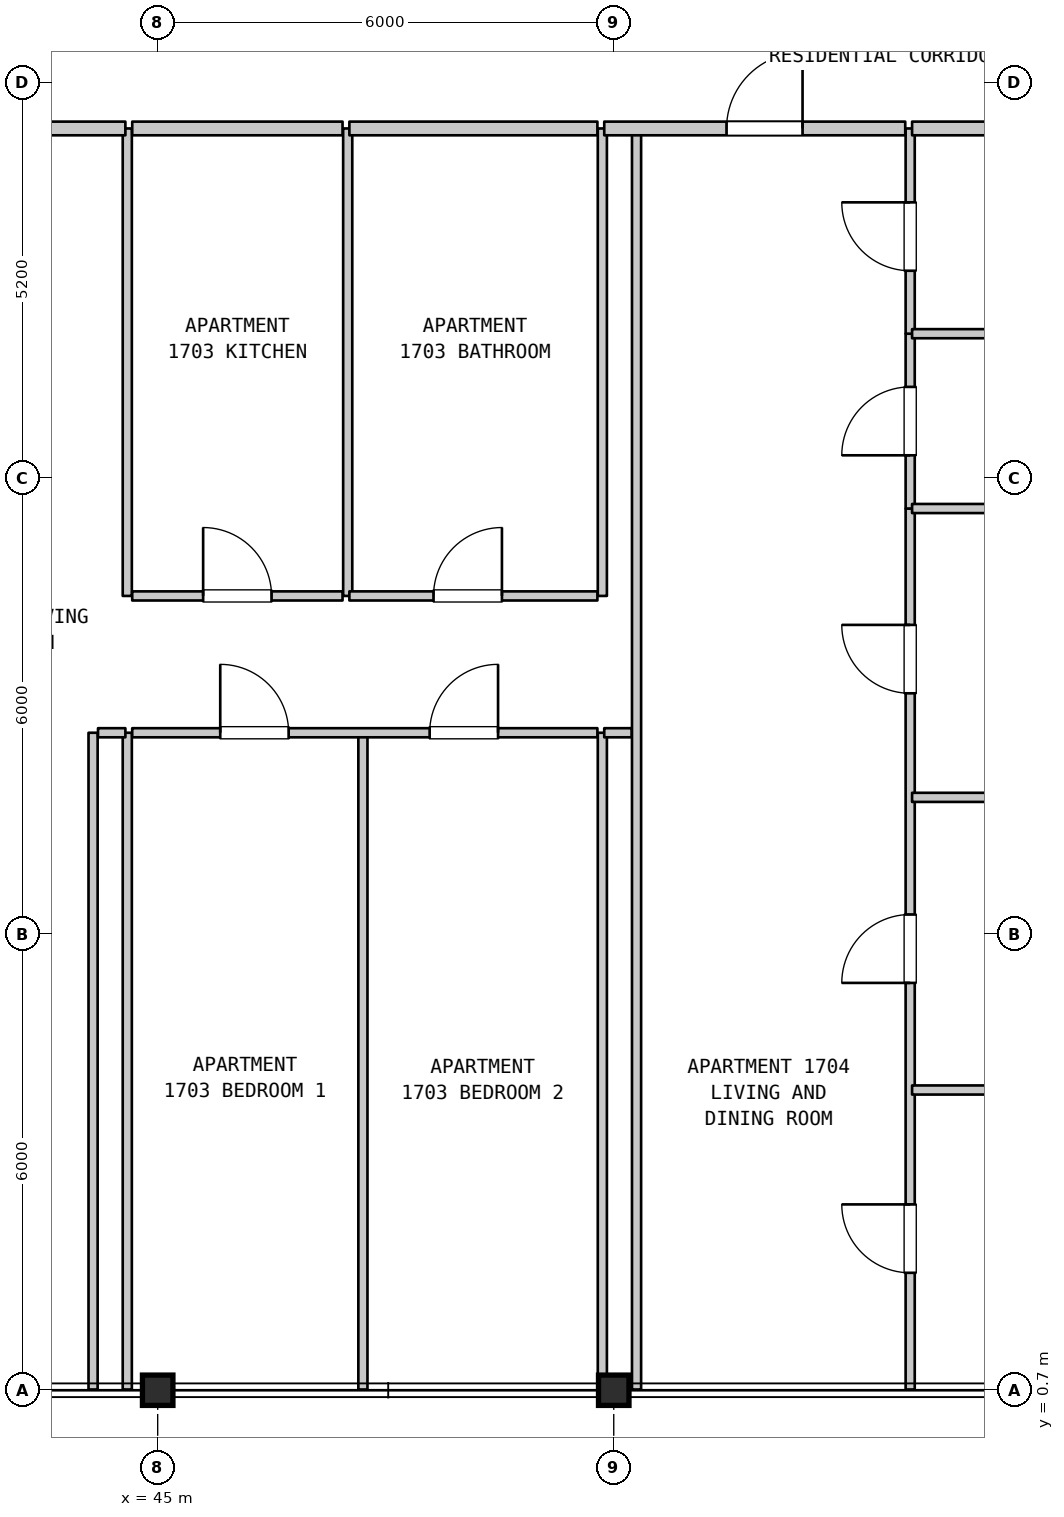
"""IFC4 building model, lengths in metres.
Left out: names, types, materials, properties, quantities, classifications, styles, units other than length and angle.
Written with IfcOpenShell. Run it as: python <this file> out.ifc"""

import sys

from ifc_helpers import new_model, si_unit, direction, frame, frame_2d, origin, origin_2d, place, context, subcontext, project, spatial, rectangle, i_section, extrude, element, fill, save


model = new_model("IFC4")
c1 = context("Model", 3, precision=1e-05, world=origin(), true_north=direction((0.0, 1.0)))
c2 = subcontext(c1, "Body", "Model", "MODEL_VIEW")
j1 = project(units=[si_unit("LENGTHUNIT", "METRE"), si_unit("PLANEANGLEUNIT", "RADIAN")], contexts=[c1])
p1 = place(None, origin())
s1 = spatial("IfcSite", under=j1, at=p1, CompositionType="ELEMENT")
p2 = place(p1, origin())
s2 = spatial("IfcBuilding", under=s1, at=p2, CompositionType="ELEMENT")
p3 = place(p2, frame((0.0, 0.0, 73.8)))
s3 = spatial("IfcBuildingStorey", under=s2, at=p3, CompositionType="ELEMENT", Elevation=73.8)
for number, where, z_axis, x_axis in (
    (1, (45.0, 0.7, 0.0), (0.0, 0.0, 1.0), (1.0, 0.0, 0.0)),
    (2, (51.0, 0.7, 0.0), (0.0, 0.0, 1.0), (1.0, 0.0, 0.0)),
):
    element("IfcColumn", number, at=place(p3, frame(where, z_axis=z_axis, x_axis=x_axis)), inside=s3, PredefinedType="COLUMN", context=c2, shape_type="SweptSolid", body=[
        extrude(i_section(OverallWidth=0.401, OverallDepth=0.399, WebThickness=0.025, FlangeThickness=0.04, FilletRadius=0.015, at=origin_2d()), origin(), (0.0, 0.0, 1.0), 3.7),
    ])
for number, where, z_axis, x_axis in (
    (3, (44.15, 0.71, 0.0), (0.0, 0.0, 1.0), (0.0, 1.0, 0.0)),
    (4, (44.6, 0.71, 0.0), (0.0, 0.0, 1.0), (0.0, 1.0, 0.0)),
):
    element("IfcWall", number, at=place(p3, frame(where, z_axis=z_axis, x_axis=x_axis)), inside=s3, PredefinedType="PARTITIONING", context=c2, shape_type="SweptSolid", body=[
        extrude(rectangle(XDim=8.64, YDim=0.12, at=frame_2d((4.32, 0.0))), origin(), (0.0, 0.0, 1.0), 3.385),
    ])
for number, where, z_axis, x_axis in (
    (5, (44.6, 11.15, 0.0), (0.0, 0.0, 1.0), (0.0, 1.0, 0.0)),
    (6, (47.5, 11.15, 0.0), (0.0, 0.0, 1.0), (0.0, 1.0, 0.0)),
):
    element("IfcWall", number, at=place(p3, frame(where, z_axis=z_axis, x_axis=x_axis)), inside=s3, PredefinedType="PARTITIONING", context=c2, shape_type="SweptSolid", body=[
        extrude(rectangle(XDim=6.15, YDim=0.12, at=frame_2d((3.075, 0.0))), origin(), (0.0, 0.0, 1.0), 3.385),
    ])
for number, where, z_axis, x_axis in (
    (7, (47.7, 0.71, 0.0), (0.0, 0.0, 1.0), (0.0, 1.0, 0.0)),
    (8, (50.85, 0.71, 0.0), (0.0, 0.0, 1.0), (0.0, 1.0, 0.0)),
):
    element("IfcWall", number, at=place(p3, frame(where, z_axis=z_axis, x_axis=x_axis)), inside=s3, PredefinedType="PARTITIONING", context=c2, shape_type="SweptSolid", body=[
        extrude(rectangle(XDim=8.64, YDim=0.12, at=frame_2d((4.32, 0.0))), origin(), (0.0, 0.0, 1.0), 3.385),
    ])
p4 = place(p3, frame((50.85, 11.15, 0.0), z_axis=(0.0, 0.0, 1.0), x_axis=(0.0, 1.0, 0.0)))
e9 = element("IfcWall", 9, at=p4, inside=s3, PredefinedType="PARTITIONING", context=c2, shape_type="SweptSolid", body=[
    extrude(rectangle(XDim=6.15, YDim=0.12, at=frame_2d((3.075, 0.0))), origin(), (0.0, 0.0, 1.0), 3.385),
])
p5 = place(p3, frame((51.3, 0.71, 0.0), z_axis=(0.0, 0.0, 1.0), x_axis=(0.0, 1.0, 0.0)))
e10 = element("IfcWall", 10, at=p5, inside=s3, PredefinedType="PARTITIONING", context=c2, shape_type="SweptSolid", body=[
    extrude(rectangle(XDim=16.59, YDim=0.12, at=frame_2d((8.295, 0.0))), origin(), (0.0, 0.0, 1.0), 3.385),
])
p6 = place(p3, frame((54.9, 0.71, 0.0), z_axis=(0.0, 0.0, 1.0), x_axis=(0.0, 1.0, 0.0)))
e11 = element("IfcWall", 11, at=p6, inside=s3, PredefinedType="PARTITIONING", context=c2, shape_type="SweptSolid", body=[
    extrude(rectangle(XDim=11.59, YDim=0.12, at=frame_2d((5.795, 0.0))), origin(), (0.0, 0.0, 1.0), 3.385),
])
p7 = place(p6, frame((1.535, 0.0, 0.0)))
e12 = element("IfcOpeningElement", 12, at=p7, cuts=e11, PredefinedType="OPENING", context=c2, shape_type="SweptSolid", body=[
    extrude(rectangle(XDim=0.9, YDim=2.15, at=frame_2d((0.45, 1.075))), frame((0.0, 0.07, 0.0), z_axis=(0.0, -1.0, 0.0), x_axis=(1.0, 0.0, 0.0)), (0.0, 0.0, 1.0), 0.14),
])
p8 = place(p6, frame((5.349, 0.0, 0.0)))
e13 = element("IfcOpeningElement", 13, at=p8, cuts=e11, PredefinedType="OPENING", context=c2, shape_type="SweptSolid", body=[
    extrude(rectangle(XDim=0.9, YDim=2.15, at=frame_2d((0.45, 1.075))), frame((0.0, 0.07, 0.0), z_axis=(0.0, -1.0, 0.0), x_axis=(1.0, 0.0, 0.0)), (0.0, 0.0, 1.0), 0.14),
])
p9 = place(p6, frame((9.159, 0.0, 0.0)))
e14 = element("IfcOpeningElement", 14, at=p9, cuts=e11, PredefinedType="OPENING", context=c2, shape_type="SweptSolid", body=[
    extrude(rectangle(XDim=0.9, YDim=2.15, at=frame_2d((0.45, 1.075))), frame((0.0, 0.07, 0.0), z_axis=(0.0, -1.0, 0.0), x_axis=(1.0, 0.0, 0.0)), (0.0, 0.0, 1.0), 0.14),
])
p10 = place(p3, frame((54.9, 12.3, 0.0), z_axis=(0.0, 0.0, 1.0), x_axis=(0.0, 1.0, 0.0)))
e15 = element("IfcWall", 15, at=p10, inside=s3, PredefinedType="PARTITIONING", context=c2, shape_type="SweptSolid", body=[
    extrude(rectangle(XDim=2.3, YDim=0.12, at=frame_2d((1.15, 0.0))), origin(), (0.0, 0.0, 1.0), 3.385),
])
p11 = place(p10, frame((0.7, 0.0, 0.0)))
e16 = element("IfcOpeningElement", 16, at=p11, cuts=e15, PredefinedType="OPENING", context=c2, shape_type="SweptSolid", body=[
    extrude(rectangle(XDim=0.9, YDim=2.15, at=frame_2d((0.45, 1.075))), frame((0.0, 0.07, 0.0), z_axis=(0.0, -1.0, 0.0), x_axis=(1.0, 0.0, 0.0)), (0.0, 0.0, 1.0), 0.14),
])
p12 = place(p3, frame((54.9, 14.6, 0.0), z_axis=(0.0, 0.0, 1.0), x_axis=(0.0, 1.0, 0.0)))
e17 = element("IfcWall", 17, at=p12, inside=s3, PredefinedType="PARTITIONING", context=c2, shape_type="SweptSolid", body=[
    extrude(rectangle(XDim=2.7, YDim=0.12, at=frame_2d((1.35, 0.0))), origin(), (0.0, 0.0, 1.0), 3.385),
])
p13 = place(p12, frame((0.828, 0.0, 0.0)))
e18 = element("IfcOpeningElement", 18, at=p13, cuts=e17, PredefinedType="OPENING", context=c2, shape_type="SweptSolid", body=[
    extrude(rectangle(XDim=0.9, YDim=2.1, at=frame_2d((0.45, 1.05))), frame((0.0, 0.07, 0.0), z_axis=(0.0, -1.0, 0.0), x_axis=(1.0, 0.0, 0.0)), (0.0, 0.0, 1.0), 0.14),
])
for number, where, z_axis, x_axis in (
    (19, (54.925, 4.65, 0.0), (0.0, 0.0, 1.0), (1.0, 0.0, 0.0)),
    (20, (54.925, 8.5, 0.0), (0.0, 0.0, 1.0), (1.0, 0.0, 0.0)),
):
    element("IfcWall", number, at=place(p3, frame(where, z_axis=z_axis, x_axis=x_axis)), inside=s3, PredefinedType="PARTITIONING", context=c2, shape_type="SweptSolid", body=[
        extrude(rectangle(XDim=5.64, YDim=0.12, at=frame_2d((2.82, 0.0))), origin(), (0.0, 0.0, 1.0), 3.385),
    ])
p14 = place(p3, frame((44.215, 9.35, 0.0), z_axis=(0.0, 0.0, 1.0), x_axis=(1.0, 0.0, 0.0)))
e21 = element("IfcWall", 21, at=p14, inside=s3, PredefinedType="PARTITIONING", context=c2, shape_type="SweptSolid", body=[
    extrude(rectangle(XDim=0.36, YDim=0.12, at=frame_2d((0.18, 0.0))), origin(), (0.0, 0.0, 1.0), 3.385),
])
p15 = place(p3, frame((44.665, 9.35, 0.0), z_axis=(0.0, 0.0, 1.0), x_axis=(1.0, 0.0, 0.0)))
e22 = element("IfcWall", 22, at=p15, inside=s3, PredefinedType="PARTITIONING", context=c2, shape_type="SweptSolid", body=[
    extrude(rectangle(XDim=6.12, YDim=0.12, at=frame_2d((3.06, 0.0))), origin(), (0.0, 0.0, 1.0), 3.385),
])
p16 = place(p15, frame((1.158, 0.0, 0.0)))
e23 = element("IfcOpeningElement", 23, at=p16, cuts=e22, PredefinedType="OPENING", context=c2, shape_type="SweptSolid", body=[
    extrude(rectangle(XDim=0.9, YDim=2.15, at=frame_2d((0.45, 1.075))), frame((0.0, 0.07, 0.0), z_axis=(0.0, -1.0, 0.0), x_axis=(1.0, 0.0, 0.0)), (0.0, 0.0, 1.0), 0.14),
])
p17 = place(p15, frame((3.913, 0.0, 0.0)))
e24 = element("IfcOpeningElement", 24, at=p17, cuts=e22, PredefinedType="OPENING", context=c2, shape_type="SweptSolid", body=[
    extrude(rectangle(XDim=0.9, YDim=2.15, at=frame_2d((0.45, 1.075))), frame((0.0, 0.07, 0.0), z_axis=(0.0, -1.0, 0.0), x_axis=(1.0, 0.0, 0.0)), (0.0, 0.0, 1.0), 0.14),
])
p18 = place(p3, frame((50.875, 9.35, 0.0), z_axis=(0.0, 0.0, 1.0), x_axis=(1.0, 0.0, 0.0)))
e25 = element("IfcWall", 25, at=p18, inside=s3, PredefinedType="PARTITIONING", context=c2, shape_type="SweptSolid", body=[
    extrude(rectangle(XDim=0.36, YDim=0.12, at=frame_2d((0.18, 0.0))), origin(), (0.0, 0.0, 1.0), 3.385),
])
p19 = place(p3, frame((44.665, 11.15, 0.0), z_axis=(0.0, 0.0, 1.0), x_axis=(1.0, 0.0, 0.0)))
e26 = element("IfcWall", 26, at=p19, inside=s3, PredefinedType="PARTITIONING", context=c2, shape_type="SweptSolid", body=[
    extrude(rectangle(XDim=2.767, YDim=0.12, at=frame_2d((1.383, 0.0))), origin(), (0.0, 0.0, 1.0), 3.385),
])
p20 = place(p19, frame((0.933, 0.0, 0.0)))
e27 = element("IfcOpeningElement", 27, at=p20, cuts=e26, PredefinedType="OPENING", context=c2, shape_type="SweptSolid", body=[
    extrude(rectangle(XDim=0.9, YDim=2.15, at=frame_2d((0.45, 1.075))), frame((0.0, 0.07, 0.0), z_axis=(0.0, -1.0, 0.0), x_axis=(1.0, 0.0, 0.0)), (0.0, 0.0, 1.0), 0.14),
])
p21 = place(p3, frame((47.522, 11.15, 0.0), z_axis=(0.0, 0.0, 1.0), x_axis=(1.0, 0.0, 0.0)))
e28 = element("IfcWall", 28, at=p21, inside=s3, PredefinedType="PARTITIONING", context=c2, shape_type="SweptSolid", body=[
    extrude(rectangle(XDim=3.263, YDim=0.12, at=frame_2d((1.631, 0.0))), origin(), (0.0, 0.0, 1.0), 3.385),
])
p22 = place(p21, frame((1.107, 0.0, 0.0)))
e29 = element("IfcOpeningElement", 29, at=p22, cuts=e28, PredefinedType="OPENING", context=c2, shape_type="SweptSolid", body=[
    extrude(rectangle(XDim=0.9, YDim=2.1, at=frame_2d((0.45, 1.05))), frame((0.0, 0.07, 0.0), z_axis=(0.0, -1.0, 0.0), x_axis=(1.0, 0.0, 0.0)), (0.0, 0.0, 1.0), 0.14),
])
for number, where, z_axis, x_axis in (
    (30, (54.925, 12.3, 0.0), (0.0, 0.0, 1.0), (1.0, 0.0, 0.0)),
    (31, (54.925, 14.6, 0.0), (0.0, 0.0, 1.0), (1.0, 0.0, 0.0)),
):
    element("IfcWall", number, at=place(p3, frame(where, z_axis=z_axis, x_axis=x_axis)), inside=s3, PredefinedType="PARTITIONING", context=c2, shape_type="SweptSolid", body=[
        extrude(rectangle(XDim=5.64, YDim=0.12, at=frame_2d((2.82, 0.0))), origin(), (0.0, 0.0, 1.0), 3.385),
    ])
p23 = place(p3, frame((39.935, 17.3, 0.0), z_axis=(0.0, 0.0, 1.0), x_axis=(1.0, 0.0, 0.0)))
e32 = element("IfcWall", 32, at=p23, inside=s3, PredefinedType="STANDARD", context=c2, shape_type="SweptSolid", body=[
    extrude(rectangle(XDim=4.64, YDim=0.18, at=frame_2d((2.32, 0.0))), origin(), (0.0, 0.0, 1.0), 3.385),
])
p24 = place(p23, frame((2.02, 0.0, 0.0)))
e33 = element("IfcOpeningElement", 33, at=p24, cuts=e32, PredefinedType="OPENING", context=c2, shape_type="SweptSolid", body=[
    extrude(rectangle(XDim=1.0, YDim=2.15, at=frame_2d((0.5, 1.075))), frame((0.0, 0.1, 0.0), z_axis=(0.0, -1.0, 0.0), x_axis=(1.0, 0.0, 0.0)), (0.0, 0.0, 1.0), 0.2),
])
p25 = place(p3, frame((44.665, 17.3, 0.0), z_axis=(0.0, 0.0, 1.0), x_axis=(1.0, 0.0, 0.0)))
e34 = element("IfcWall", 34, at=p25, inside=s3, PredefinedType="STANDARD", context=c2, shape_type="SweptSolid", body=[
    extrude(rectangle(XDim=2.767, YDim=0.18, at=frame_2d((1.383, 0.0))), origin(), (0.0, 0.0, 1.0), 3.385),
])
p26 = place(p3, frame((47.522, 17.3, 0.0), z_axis=(0.0, 0.0, 1.0), x_axis=(1.0, 0.0, 0.0)))
e35 = element("IfcWall", 35, at=p26, inside=s3, PredefinedType="STANDARD", context=c2, shape_type="SweptSolid", body=[
    extrude(rectangle(XDim=3.263, YDim=0.18, at=frame_2d((1.631, 0.0))), origin(), (0.0, 0.0, 1.0), 3.385),
])
p27 = place(p3, frame((50.875, 17.3, 0.0), z_axis=(0.0, 0.0, 1.0), x_axis=(1.0, 0.0, 0.0)))
e36 = element("IfcWall", 36, at=p27, inside=s3, PredefinedType="STANDARD", context=c2, shape_type="SweptSolid", body=[
    extrude(rectangle(XDim=3.96, YDim=0.18, at=frame_2d((1.98, 0.0))), origin(), (0.0, 0.0, 1.0), 3.385),
])
p28 = place(p27, frame((1.609, 0.0, 0.0)))
e37 = element("IfcOpeningElement", 37, at=p28, cuts=e36, PredefinedType="OPENING", context=c2, shape_type="SweptSolid", body=[
    extrude(rectangle(XDim=1.0, YDim=2.15, at=frame_2d((0.5, 1.075))), frame((0.0, 0.1, 0.0), z_axis=(0.0, -1.0, 0.0), x_axis=(1.0, 0.0, 0.0)), (0.0, 0.0, 1.0), 0.2),
])
p29 = place(p3, frame((54.925, 17.3, 0.0), z_axis=(0.0, 0.0, 1.0), x_axis=(1.0, 0.0, 0.0)))
e38 = element("IfcWall", 38, at=p29, inside=s3, PredefinedType="STANDARD", context=c2, shape_type="SweptSolid", body=[
    extrude(rectangle(XDim=5.64, YDim=0.18, at=frame_2d((2.82, 0.0))), origin(), (0.0, 0.0, 1.0), 3.385),
])
p30 = place(p7, origin())
e39 = element("IfcDoor", 39, at=p30, inside=s3, OperationType="SINGLE_SWING_RIGHT", PredefinedType="DOOR", context=c2, shape_type="SweptSolid", body=[
    extrude(rectangle(XDim=0.9, YDim=2.15, at=frame_2d((0.45, 1.075))), frame((0.0, 0.025, 0.0), z_axis=(0.0, -1.0, 0.0), x_axis=(1.0, 0.0, 0.0)), (0.0, 0.0, 1.0), 0.05),
])
fill(e12, e39)
p31 = place(p8, origin())
e40 = element("IfcDoor", 40, at=p31, inside=s3, OperationType="SINGLE_SWING_LEFT", PredefinedType="DOOR", context=c2, shape_type="SweptSolid", body=[
    extrude(rectangle(XDim=0.9, YDim=2.15, at=frame_2d((0.45, 1.075))), frame((0.0, 0.025, 0.0), z_axis=(0.0, -1.0, 0.0), x_axis=(1.0, 0.0, 0.0)), (0.0, 0.0, 1.0), 0.05),
])
fill(e13, e40)
p32 = place(p9, origin())
e41 = element("IfcDoor", 41, at=p32, inside=s3, OperationType="SINGLE_SWING_RIGHT", PredefinedType="DOOR", context=c2, shape_type="SweptSolid", body=[
    extrude(rectangle(XDim=0.9, YDim=2.15, at=frame_2d((0.45, 1.075))), frame((0.0, 0.025, 0.0), z_axis=(0.0, -1.0, 0.0), x_axis=(1.0, 0.0, 0.0)), (0.0, 0.0, 1.0), 0.05),
])
fill(e14, e41)
p33 = place(p11, origin())
e42 = element("IfcDoor", 42, at=p33, inside=s3, OperationType="SINGLE_SWING_LEFT", PredefinedType="DOOR", context=c2, shape_type="SweptSolid", body=[
    extrude(rectangle(XDim=0.9, YDim=2.15, at=frame_2d((0.45, 1.075))), frame((0.0, 0.025, 0.0), z_axis=(0.0, -1.0, 0.0), x_axis=(1.0, 0.0, 0.0)), (0.0, 0.0, 1.0), 0.05),
])
fill(e16, e42)
p34 = place(p13, origin())
e43 = element("IfcDoor", 43, at=p34, inside=s3, OperationType="SINGLE_SWING_RIGHT", PredefinedType="DOOR", context=c2, shape_type="SweptSolid", body=[
    extrude(rectangle(XDim=0.9, YDim=2.1, at=frame_2d((0.45, 1.05))), frame((0.0, 0.025, 0.0), z_axis=(0.0, -1.0, 0.0), x_axis=(1.0, 0.0, 0.0)), (0.0, 0.0, 1.0), 0.05),
])
fill(e18, e43)
p35 = place(p16, origin())
e44 = element("IfcDoor", 44, at=p35, inside=s3, OperationType="SINGLE_SWING_LEFT", PredefinedType="DOOR", context=c2, shape_type="SweptSolid", body=[
    extrude(rectangle(XDim=0.9, YDim=2.15, at=frame_2d((0.45, 1.075))), frame((0.0, 0.025, 0.0), z_axis=(0.0, -1.0, 0.0), x_axis=(1.0, 0.0, 0.0)), (0.0, 0.0, 1.0), 0.05),
])
fill(e23, e44)
p36 = place(p17, origin())
e45 = element("IfcDoor", 45, at=p36, inside=s3, OperationType="SINGLE_SWING_RIGHT", PredefinedType="DOOR", context=c2, shape_type="SweptSolid", body=[
    extrude(rectangle(XDim=0.9, YDim=2.15, at=frame_2d((0.45, 1.075))), frame((0.0, 0.025, 0.0), z_axis=(0.0, -1.0, 0.0), x_axis=(1.0, 0.0, 0.0)), (0.0, 0.0, 1.0), 0.05),
])
fill(e24, e45)
p37 = place(p20, origin())
e46 = element("IfcDoor", 46, at=p37, inside=s3, OperationType="SINGLE_SWING_LEFT", PredefinedType="DOOR", context=c2, shape_type="SweptSolid", body=[
    extrude(rectangle(XDim=0.9, YDim=2.15, at=frame_2d((0.45, 1.075))), frame((0.0, 0.025, 0.0), z_axis=(0.0, -1.0, 0.0), x_axis=(1.0, 0.0, 0.0)), (0.0, 0.0, 1.0), 0.05),
])
fill(e27, e46)
p38 = place(p22, origin())
e47 = element("IfcDoor", 47, at=p38, inside=s3, OperationType="SINGLE_SWING_RIGHT", PredefinedType="DOOR", context=c2, shape_type="SweptSolid", body=[
    extrude(rectangle(XDim=0.9, YDim=2.1, at=frame_2d((0.45, 1.05))), frame((0.0, 0.025, 0.0), z_axis=(0.0, -1.0, 0.0), x_axis=(1.0, 0.0, 0.0)), (0.0, 0.0, 1.0), 0.05),
])
fill(e29, e47)
p39 = place(p28, origin())
e48 = element("IfcDoor", 48, at=p39, inside=s3, OperationType="SINGLE_SWING_RIGHT", PredefinedType="DOOR", context=c2, shape_type="SweptSolid", body=[
    extrude(rectangle(XDim=1.0, YDim=2.15, at=frame_2d((0.5, 1.075))), frame((0.0, 0.025, 0.0), z_axis=(0.0, -1.0, 0.0), x_axis=(1.0, 0.0, 0.0)), (0.0, 0.0, 1.0), 0.05),
])
fill(e37, e48)
save(model, sys.argv[1])
